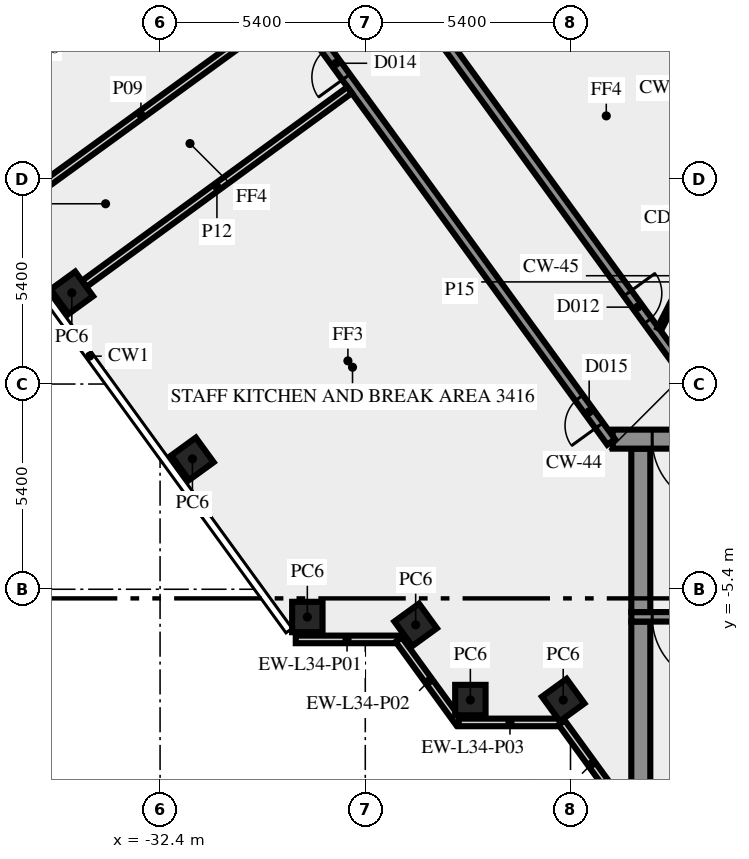
"""IFC4 building model, lengths in metres.
Left out: names, types, materials, properties, quantities, classifications, styles, units other than length and angle.
Written with IfcOpenShell. Run it as: python <this file> out.ifc"""

import sys

from ifc_helpers import new_model, si_unit, direction, frame, frame_2d, origin, origin_2d, place, context, subcontext, project, spatial, rectangle, extrude, element, fill, save


model = new_model("IFC4")
c1 = context("Model", 3, precision=1e-05, world=origin(), true_north=direction((0.0, 1.0)))
c2 = subcontext(c1, "Body", "Model", "MODEL_VIEW")
j1 = project(units=[si_unit("LENGTHUNIT", "METRE"), si_unit("PLANEANGLEUNIT", "RADIAN")], contexts=[c1])
p1 = place(None, origin())
s1 = spatial("IfcSite", under=j1, at=p1, CompositionType="ELEMENT")
p2 = place(p1, origin())
s2 = spatial("IfcBuilding", under=s1, at=p2, CompositionType="ELEMENT")
p3 = place(p2, frame((0.0, 0.0, 148.0)))
s3 = spatial("IfcBuildingStorey", under=s2, at=p3, CompositionType="ELEMENT", Elevation=148.0)
for number, where, z_axis, x_axis in (
    (1, (-34.722, 2.4, 0.0), (0.0, 0.0, 1.0), (0.588, -0.809, 0.0)),
    (2, (-31.548, -1.969, 0.0), (0.0, 0.0, 1.0), (0.588, -0.809, 0.0)),
    (3, (-28.525, -6.13, 0.0), (0.0, 0.0, 1.0), (1.0, 0.0, 0.0)),
    (4, (-25.674, -6.337, 0.0), (0.0, 0.0, 1.0), (0.588, -0.809, 0.0)),
    (5, (-24.235, -8.315, 0.0), (0.0, 0.0, 1.0), (1.0, 0.0, 0.0)),
    (6, (-21.792, -8.315, 0.0), (0.0, 0.0, 1.0), (0.588, -0.809, 0.0)),
):
    element("IfcColumn", number, at=place(p3, frame(where, z_axis=z_axis, x_axis=x_axis)), inside=s3, PredefinedType="COLUMN", context=c2, shape_type="SweptSolid", body=[
        extrude(rectangle(XDim=0.8, YDim=0.8, at=origin_2d()), origin(), (0.0, 0.0, 1.0), 3.65),
    ])
p4 = place(p3, frame((-28.83, -6.719, 0.0), z_axis=(0.0, 0.0, 1.0), x_axis=(1.0, 0.0, 0.0)))
e7 = element("IfcWall", 7, at=p4, inside=s3, PredefinedType="SOLIDWALL", context=c2, shape_type="SweptSolid", body=[
    extrude(rectangle(XDim=2.7, YDim=0.2, at=frame_2d((1.35, 0.0))), origin(), (0.0, 0.0, 1.0), 3.65),
])
p5 = place(p3, frame((-26.12, -6.724, 0.0), z_axis=(0.0, 0.0, 1.0), x_axis=(0.587720002413, -0.809064397168, 0.0)))
e8 = element("IfcWall", 8, at=p5, inside=s3, PredefinedType="SOLIDWALL", context=c2, shape_type="SweptSolid", body=[
    extrude(rectangle(XDim=2.7, YDim=0.2, at=frame_2d((1.35, 0.0))), origin(), (0.0, 0.0, 1.0), 3.65),
])
p6 = place(p3, frame((-24.543, -8.904, 0.0), z_axis=(0.0, 0.0, 1.0), x_axis=(1.0, 0.0, 0.0)))
e9 = element("IfcWall", 9, at=p6, inside=s3, PredefinedType="SOLIDWALL", context=c2, shape_type="SweptSolid", body=[
    extrude(rectangle(XDim=2.7, YDim=0.2, at=frame_2d((1.35, 0.0))), origin(), (0.0, 0.0, 1.0), 3.65),
])
p7 = place(p3, frame((-21.833, -8.909, 0.0), z_axis=(0.0, 0.0, 1.0), x_axis=(0.587766567315, -0.809030569476, 0.0)))
e10 = element("IfcWall", 10, at=p7, inside=s3, PredefinedType="SOLIDWALL", context=c2, shape_type="SweptSolid", body=[
    extrude(rectangle(XDim=2.688, YDim=0.2, at=frame_2d((1.344, 0.0))), origin(), (0.0, 0.0, 1.0), 3.65),
])
p8 = place(p3, frame((-19.75, -10.5, 0.0), z_axis=(0.0, 0.0, 1.0), x_axis=(0.0, 1.0, 0.0)))
e11 = element("IfcWall", 11, at=p8, inside=s3, PredefinedType="SHEAR", context=c2, shape_type="SweptSolid", body=[
    extrude(rectangle(XDim=4.25, YDim=0.5, at=frame_2d((2.125, 0.0))), origin(), (0.0, 0.0, 1.0), 3.65),
])
p9 = place(p3, frame((-9.8, -6.125, 0.0), z_axis=(0.0, 0.0, 1.0), x_axis=(-1.0, 0.0, 0.0)))
e12 = element("IfcWall", 12, at=p9, inside=s3, PredefinedType="SHEAR", context=c2, shape_type="SweptSolid", body=[
    extrude(rectangle(XDim=10.2, YDim=0.25, at=frame_2d((5.1, 0.0))), origin(), (0.0, 0.0, 1.0), 3.65),
])
p10 = place(p9, frame((7.85, 0.0, 0.0)))
e13 = element("IfcOpeningElement", 13, at=p10, cuts=e12, PredefinedType="OPENING", context=c2, shape_type="SweptSolid", body=[
    extrude(rectangle(XDim=1.8, YDim=2.1, at=frame_2d((0.9, 1.05))), frame((0.0, 0.135, 0.0), z_axis=(0.0, -1.0, 0.0), x_axis=(1.0, 0.0, 0.0)), (0.0, 0.0, 1.0), 0.27),
])
p11 = place(p3, frame((-19.75, -6.0, 0.0), z_axis=(0.0, 0.0, 1.0), x_axis=(0.0, 1.0, 0.0)))
e14 = element("IfcWall", 14, at=p11, inside=s3, PredefinedType="SHEAR", context=c2, shape_type="SweptSolid", body=[
    extrude(rectangle(XDim=4.3, YDim=0.5, at=frame_2d((2.15, 0.0))), origin(), (0.0, 0.0, 1.0), 3.65),
])
p12 = place(p3, frame((20.49, -1.45, 0.0), z_axis=(0.0, 0.0, 1.0), x_axis=(-1.0, 0.0, 0.0)))
e15 = element("IfcWall", 15, at=p12, inside=s3, PredefinedType="SHEAR", context=c2, shape_type="SweptSolid", body=[
    extrude(rectangle(XDim=40.98, YDim=0.5, at=frame_2d((20.49, 0.0))), origin(), (0.0, 0.0, 1.0), 3.65),
])
p13 = place(p12, frame((38.14, 0.0, 0.0)))
e16 = element("IfcOpeningElement", 16, at=p13, cuts=e15, PredefinedType="OPENING", context=c2, shape_type="SweptSolid", body=[
    extrude(rectangle(XDim=1.8, YDim=2.1, at=frame_2d((0.9, 1.05))), frame((0.0, 0.26, 0.0), z_axis=(0.0, -1.0, 0.0), x_axis=(1.0, 0.0, 0.0)), (0.0, 0.0, 1.0), 0.52),
])
p14 = place(p12, frame((35.89, 0.0, 0.0)))
e17 = element("IfcOpeningElement", 17, at=p14, cuts=e15, PredefinedType="OPENING", context=c2, shape_type="SweptSolid", body=[
    extrude(rectangle(XDim=0.9, YDim=2.1, at=frame_2d((0.45, 1.05))), frame((0.0, 0.26, 0.0), z_axis=(0.0, -1.0, 0.0), x_axis=(1.0, 0.0, 0.0)), (0.0, 0.0, 1.0), 0.52),
])
p15 = place(p12, frame((32.94, 0.0, 0.0)))
e18 = element("IfcOpeningElement", 18, at=p15, cuts=e15, PredefinedType="OPENING", context=c2, shape_type="SweptSolid", body=[
    extrude(rectangle(XDim=0.9, YDim=2.1, at=frame_2d((0.45, 1.05))), frame((0.0, 0.26, 0.0), z_axis=(0.0, -1.0, 0.0), x_axis=(1.0, 0.0, 0.0)), (0.0, 0.0, 1.0), 0.52),
])
p16 = place(p12, frame((29.802, 0.0, 0.0)))
e19 = element("IfcOpeningElement", 19, at=p16, cuts=e15, PredefinedType="OPENING", context=c2, shape_type="SweptSolid", body=[
    extrude(rectangle(XDim=0.9, YDim=2.1, at=frame_2d((0.45, 1.05))), frame((0.0, 0.26, 0.0), z_axis=(0.0, -1.0, 0.0), x_axis=(1.0, 0.0, 0.0)), (0.0, 0.0, 1.0), 0.52),
])
p17 = place(p12, frame((26.077, 0.0, 0.0)))
e20 = element("IfcOpeningElement", 20, at=p17, cuts=e15, PredefinedType="OPENING", context=c2, shape_type="SweptSolid", body=[
    extrude(rectangle(XDim=0.9, YDim=2.1, at=frame_2d((0.45, 1.05))), frame((0.0, 0.26, 0.0), z_axis=(0.0, -1.0, 0.0), x_axis=(1.0, 0.0, 0.0)), (0.0, 0.0, 1.0), 0.52),
])
p18 = place(p12, frame((19.59, 0.0, 0.0)))
e21 = element("IfcOpeningElement", 21, at=p18, cuts=e15, PredefinedType="OPENING", context=c2, shape_type="SweptSolid", body=[
    extrude(rectangle(XDim=2.0, YDim=2.1, at=frame_2d((1.0, 1.05))), frame((0.0, 0.26, 0.0), z_axis=(0.0, -1.0, 0.0), x_axis=(1.0, 0.0, 0.0)), (0.0, 0.0, 1.0), 0.52),
])
p19 = place(p12, frame((7.14, 0.0, 0.0)))
e22 = element("IfcOpeningElement", 22, at=p19, cuts=e15, PredefinedType="OPENING", context=c2, shape_type="SweptSolid", body=[
    extrude(rectangle(XDim=0.9, YDim=2.1, at=frame_2d((0.45, 1.05))), frame((0.0, 0.26, 0.0), z_axis=(0.0, -1.0, 0.0), x_axis=(1.0, 0.0, 0.0)), (0.0, 0.0, 1.0), 0.52),
])
p20 = place(p12, frame((5.028, 0.0, 0.0)))
e23 = element("IfcOpeningElement", 23, at=p20, cuts=e15, PredefinedType="OPENING", context=c2, shape_type="SweptSolid", body=[
    extrude(rectangle(XDim=0.8, YDim=2.1, at=frame_2d((0.4, 1.05))), frame((0.0, 0.26, 0.0), z_axis=(0.0, -1.0, 0.0), x_axis=(1.0, 0.0, 0.0)), (0.0, 0.0, 1.0), 0.52),
])
p21 = place(p12, frame((3.452, 0.0, 0.0)))
e24 = element("IfcOpeningElement", 24, at=p21, cuts=e15, PredefinedType="OPENING", context=c2, shape_type="SweptSolid", body=[
    extrude(rectangle(XDim=0.8, YDim=2.1, at=frame_2d((0.4, 1.05))), frame((0.0, 0.26, 0.0), z_axis=(0.0, -1.0, 0.0), x_axis=(1.0, 0.0, 0.0)), (0.0, 0.0, 1.0), 0.52),
])
p22 = place(p12, frame((1.04, 0.0, 0.0)))
e25 = element("IfcOpeningElement", 25, at=p22, cuts=e15, PredefinedType="OPENING", context=c2, shape_type="SweptSolid", body=[
    extrude(rectangle(XDim=1.8, YDim=2.1, at=frame_2d((0.9, 1.05))), frame((0.0, 0.26, 0.0), z_axis=(0.0, -1.0, 0.0), x_axis=(1.0, 0.0, 0.0)), (0.0, 0.0, 1.0), 0.52),
])
p23 = place(p3, frame((-20.531, -1.523, 0.0), z_axis=(0.0, 0.0, 1.0), x_axis=(-0.587785812891, 0.809016587076, 0.0)))
e26 = element("IfcWall", 26, at=p23, inside=s3, PredefinedType="SOLIDWALL", context=c2, shape_type="SweptSolid", body=[
    extrude(rectangle(XDim=28.67, YDim=0.25, at=frame_2d((14.335, 0.0))), origin(), (0.0, 0.0, 1.0), 3.65),
])
p24 = place(p23, frame((27.296, 0.0, 0.0)))
e27 = element("IfcOpeningElement", 27, at=p24, cuts=e26, PredefinedType="OPENING", context=c2, shape_type="SweptSolid", body=[
    extrude(rectangle(XDim=0.9, YDim=2.1, at=frame_2d((0.45, 1.05))), frame((0.0, 0.135, 0.0), z_axis=(0.0, -1.0, 0.0), x_axis=(1.0, 0.0, 0.0)), (0.0, 0.0, 1.0), 0.27),
])
p25 = place(p23, frame((11.866, 0.0, 0.0)))
e28 = element("IfcOpeningElement", 28, at=p25, cuts=e26, PredefinedType="OPENING", context=c2, shape_type="SweptSolid", body=[
    extrude(rectangle(XDim=0.9, YDim=2.1, at=frame_2d((0.45, 1.05))), frame((0.0, 0.135, 0.0), z_axis=(0.0, -1.0, 0.0), x_axis=(1.0, 0.0, 0.0)), (0.0, 0.0, 1.0), 0.27),
])
p26 = place(p23, frame((0.533, 0.0, 0.0)))
e29 = element("IfcOpeningElement", 29, at=p26, cuts=e26, PredefinedType="OPENING", context=c2, shape_type="SweptSolid", body=[
    extrude(rectangle(XDim=0.9, YDim=2.1, at=frame_2d((0.45, 1.05))), frame((0.0, 0.135, 0.0), z_axis=(0.0, -1.0, 0.0), x_axis=(1.0, 0.0, 0.0)), (0.0, 0.0, 1.0), 0.27),
])
p27 = place(p3, frame((-35.092, 23.027, 0.0), z_axis=(0.0, 0.0, 1.0), x_axis=(0.587784076945, -0.809017848313, 0.0)))
e30 = element("IfcWall", 30, at=p27, inside=s3, PredefinedType="SOLIDWALL", context=c2, shape_type="SweptSolid", body=[
    extrude(rectangle(XDim=29.853, YDim=0.25, at=frame_2d((14.927, 0.0))), origin(), (0.0, 0.0, 1.0), 3.65),
])
p28 = place(p27, frame((0.224, 0.0, 0.0)))
e31 = element("IfcOpeningElement", 31, at=p28, cuts=e30, PredefinedType="OPENING", context=c2, shape_type="SweptSolid", body=[
    extrude(rectangle(XDim=0.9, YDim=2.1, at=frame_2d((0.45, 1.05))), frame((0.0, 0.135, 0.0), z_axis=(0.0, -1.0, 0.0), x_axis=(1.0, 0.0, 0.0)), (0.0, 0.0, 1.0), 0.27),
])
p29 = place(p27, frame((25.512, 0.0, 0.0)))
e32 = element("IfcOpeningElement", 32, at=p29, cuts=e30, PredefinedType="OPENING", context=c2, shape_type="SweptSolid", body=[
    extrude(rectangle(XDim=0.9, YDim=2.1, at=frame_2d((0.45, 1.05))), frame((0.0, 0.135, 0.0), z_axis=(0.0, -1.0, 0.0), x_axis=(1.0, 0.0, 0.0)), (0.0, 0.0, 1.0), 0.27),
])
p30 = place(p3, frame((-36.807, 4.247, 0.0), z_axis=(0.0, 0.0, 1.0), x_axis=(0.809002920164, 0.587804623294, 0.0)))
e33 = element("IfcWall", 33, at=p30, inside=s3, PredefinedType="SOLIDWALL", context=c2, shape_type="SweptSolid", body=[
    extrude(rectangle(XDim=9.651, YDim=0.2, at=frame_2d((4.825, 0.0))), origin(), (0.0, 0.0, 1.0), 2.85),
])
p31 = place(p3, frame((-34.395, 2.638, 0.0), z_axis=(0.0, 0.0, 1.0), x_axis=(0.807657534767, 0.589651851973, 0.0)))
e34 = element("IfcWall", 34, at=p31, inside=s3, PredefinedType="SOLIDWALL", context=c2, shape_type="SweptSolid", body=[
    extrude(rectangle(XDim=8.644, YDim=0.2, at=frame_2d((4.322, 0.0))), origin(), (0.0, 0.0, 1.0), 3.65),
])
p32 = place(p3, frame((-19.261, 1.45, 0.0), z_axis=(0.0, 0.0, 1.0), x_axis=(0.453950796792, 0.891026752736, 0.0)))
e35 = element("IfcWall", 35, at=p32, inside=s3, PredefinedType="PARTITIONING", context=c2, shape_type="SweptSolid", body=[
    extrude(rectangle(XDim=2.778, YDim=0.12, at=frame_2d((1.389, 0.0))), origin(), (0.0, 0.0, 1.0), 3.65),
])
p33 = place(p10, origin())
e36 = element("IfcDoor", 36, at=p33, inside=s3, OperationType="DOUBLE_DOOR_SINGLE_SWING", PredefinedType="DOOR", context=c2, shape_type="SweptSolid", body=[
    extrude(rectangle(XDim=1.8, YDim=2.1, at=frame_2d((0.9, 1.05))), frame((0.0, 0.025, 0.0), z_axis=(0.0, -1.0, 0.0), x_axis=(1.0, 0.0, 0.0)), (0.0, 0.0, 1.0), 0.05),
])
fill(e13, e36)
p34 = place(p13, origin())
e37 = element("IfcDoor", 37, at=p34, inside=s3, OperationType="DOUBLE_DOOR_SINGLE_SWING", PredefinedType="DOOR", context=c2, shape_type="SweptSolid", body=[
    extrude(rectangle(XDim=1.8, YDim=2.1, at=frame_2d((0.9, 1.05))), frame((0.0, 0.025, 0.0), z_axis=(0.0, -1.0, 0.0), x_axis=(1.0, 0.0, 0.0)), (0.0, 0.0, 1.0), 0.05),
])
fill(e16, e37)
p35 = place(p29, origin())
e38 = element("IfcDoor", 38, at=p35, inside=s3, OperationType="SINGLE_SWING_RIGHT", PredefinedType="DOOR", context=c2, shape_type="SweptSolid", body=[
    extrude(rectangle(XDim=0.9, YDim=2.1, at=frame_2d((0.45, 1.05))), frame((0.0, 0.025, 0.0), z_axis=(0.0, -1.0, 0.0), x_axis=(1.0, 0.0, 0.0)), (0.0, 0.0, 1.0), 0.05),
])
fill(e32, e38)
p36 = place(p25, origin())
e39 = element("IfcDoor", 39, at=p36, inside=s3, OperationType="SINGLE_SWING_LEFT", PredefinedType="DOOR", context=c2, shape_type="SweptSolid", body=[
    extrude(rectangle(XDim=0.9, YDim=2.1, at=frame_2d((0.45, 1.05))), frame((0.0, 0.025, 0.0), z_axis=(0.0, -1.0, 0.0), x_axis=(1.0, 0.0, 0.0)), (0.0, 0.0, 1.0), 0.05),
])
fill(e28, e39)
p37 = place(p26, origin())
e40 = element("IfcDoor", 40, at=p37, inside=s3, OperationType="SINGLE_SWING_LEFT", PredefinedType="DOOR", context=c2, shape_type="SweptSolid", body=[
    extrude(rectangle(XDim=0.9, YDim=2.1, at=frame_2d((0.45, 1.05))), frame((0.0, 0.025, 0.0), z_axis=(0.0, -1.0, 0.0), x_axis=(1.0, 0.0, 0.0)), (0.0, 0.0, 1.0), 0.05),
])
fill(e29, e40)
save(model, sys.argv[1])
